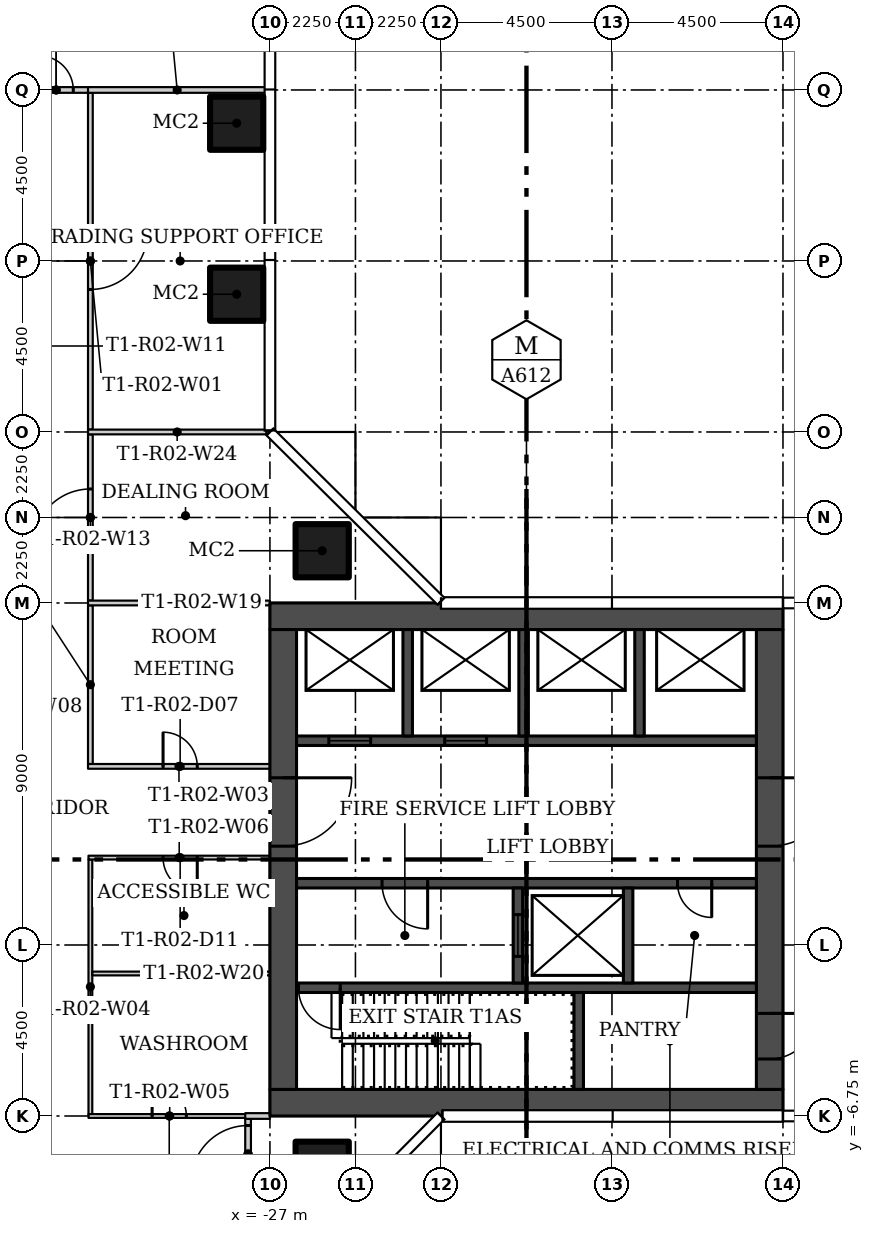
"""IFC4 building model, lengths in metres.
Left out: names, types, materials, properties, quantities, classifications, styles, units other than length and angle.
Written with IfcOpenShell. Run it as: python <this file> out.ifc"""

import sys

from ifc_helpers import new_model, si_unit, direction, frame, frame_2d, origin, origin_2d, place, context, subcontext, project, spatial, rectangle, hollow_rectangle, extrude, element, fill, save


model = new_model("IFC4")
c1 = context("Model", 3, precision=1e-05, world=origin(), true_north=direction((0.0, 1.0)))
c2 = subcontext(c1, "Body", "Model", "MODEL_VIEW")
j1 = project(units=[si_unit("LENGTHUNIT", "METRE"), si_unit("PLANEANGLEUNIT", "RADIAN")], contexts=[c1])
p1 = place(None, origin())
s1 = spatial("IfcSite", under=j1, at=p1, CompositionType="ELEMENT")
p2 = place(p1, origin())
s2 = spatial("IfcBuilding", under=s1, at=p2, CompositionType="ELEMENT")
p3 = place(p2, frame((0.0, 0.0, 33.0)))
s3 = spatial("IfcBuildingStorey", under=s2, at=p3, CompositionType="ELEMENT", Elevation=33.0)
for number, where in (
    (1, (-25.625, 8.125, 0.0)),
    (2, (-25.625, -8.125, 0.0)),
    (3, (-27.875, 14.875, 0.0)),
    (4, (-27.875, 19.375, 0.0)),
):
    element("IfcColumn", number, at=place(p3, frame(where)), inside=s3, PredefinedType="COLUMN", context=c2, shape_type="SweptSolid", body=[
        extrude(hollow_rectangle(XDim=1.4, YDim=1.4, WallThickness=0.05, at=origin_2d()), origin(), (0.0, 0.0, 1.0), 4.15),
    ])
p4 = place(p3, frame((-31.725, 20.175, 0.0), z_axis=(0.0, 0.0, 1.0), x_axis=(0.0, -1.0, 0.0)))
e5 = element("IfcWall", 5, at=p4, inside=s3, PredefinedType="PARTITIONING", context=c2, shape_type="SweptSolid", body=[
    extrude(rectangle(XDim=8.863, YDim=0.125, at=frame_2d((4.431, 0.0))), origin(), (0.0, 0.0, 1.0), 4.15),
])
p5 = place(p4, frame((3.675, 0.0, 0.0)))
e6 = element("IfcOpeningElement", 6, at=p5, cuts=e5, PredefinedType="OPENING", context=c2, shape_type="SweptSolid", body=[
    extrude(rectangle(XDim=1.5, YDim=2.1, at=frame_2d((0.75, 1.05))), frame((0.0, 0.073, 0.0), z_axis=(0.0, -1.0, 0.0), x_axis=(1.0, 0.0, 0.0)), (0.0, 0.0, 1.0), 0.145),
])
p6 = place(p3, frame((-31.725, 6.688, 0.0), z_axis=(0.0, 0.0, 1.0), x_axis=(0.0, -1.0, 0.0)))
e7 = element("IfcWall", 7, at=p6, inside=s3, PredefinedType="PARTITIONING", context=c2, shape_type="SweptSolid", body=[
    extrude(rectangle(XDim=4.175, YDim=0.125, at=frame_2d((2.087, 0.0))), origin(), (0.0, 0.0, 1.0), 4.15),
])
p7 = place(p3, frame((-31.787, 2.45, 0.0)))
e8 = element("IfcWall", 8, at=p7, inside=s3, PredefinedType="PARTITIONING", context=c2, shape_type="SweptSolid", body=[
    extrude(rectangle(XDim=4.787, YDim=0.125, at=frame_2d((2.394, 0.0))), origin(), (0.0, 0.0, 1.0), 4.15),
])
p8 = place(p7, frame((1.975, 0.0, 0.0)))
e9 = element("IfcOpeningElement", 9, at=p8, cuts=e8, PredefinedType="OPENING", context=c2, shape_type="SweptSolid", body=[
    extrude(rectangle(XDim=0.9, YDim=2.1, at=frame_2d((0.45, 1.05))), frame((0.0, 0.073, 0.0), z_axis=(0.0, -1.0, 0.0), x_axis=(1.0, 0.0, 0.0)), (0.0, 0.0, 1.0), 0.145),
])
p9 = place(p3, frame((-31.725, -0.0, 0.0), z_axis=(0.0, 0.0, 1.0), x_axis=(0.0, -1.0, 0.0)))
e10 = element("IfcWall", 10, at=p9, inside=s3, PredefinedType="PARTITIONING", context=c2, shape_type="SweptSolid", body=[
    extrude(rectangle(XDim=6.7, YDim=0.1, at=frame_2d((3.35, 0.0))), origin(), (0.0, 0.0, 1.0), 4.15),
])
p10 = place(p3, frame((-31.775, -6.75, 0.0)))
e11 = element("IfcWall", 11, at=p10, inside=s3, PredefinedType="PARTITIONING", context=c2, shape_type="SweptSolid", body=[
    extrude(rectangle(XDim=4.274, YDim=0.1, at=frame_2d((2.137, 0.0))), origin(), (0.0, 0.0, 1.0), 4.15),
])
p11 = place(p10, frame((1.675, 0.0, 0.0)))
e12 = element("IfcOpeningElement", 12, at=p11, cuts=e11, PredefinedType="OPENING", context=c2, shape_type="SweptSolid", body=[
    extrude(rectangle(XDim=0.9, YDim=2.1, at=frame_2d((0.45, 1.05))), frame((0.0, 0.06, 0.0), z_axis=(0.0, -1.0, 0.0), x_axis=(1.0, 0.0, 0.0)), (0.0, 0.0, 1.0), 0.12),
])
p12 = place(p3, frame((-27.0, 0.05, 0.0), z_axis=(0.0, 0.0, 1.0), x_axis=(-1.0, 0.0, 0.0)))
e13 = element("IfcWall", 13, at=p12, inside=s3, PredefinedType="PARTITIONING", context=c2, shape_type="SweptSolid", body=[
    extrude(rectangle(XDim=4.775, YDim=0.1, at=frame_2d((2.387, 0.0))), origin(), (0.0, 0.0, 1.0), 4.15),
])
p13 = place(p12, frame((1.912, 0.0, 0.0)))
e14 = element("IfcOpeningElement", 14, at=p13, cuts=e13, PredefinedType="OPENING", context=c2, shape_type="SweptSolid", body=[
    extrude(rectangle(XDim=0.9, YDim=2.1, at=frame_2d((0.45, 1.05))), frame((0.0, 0.06, 0.0), z_axis=(0.0, -1.0, 0.0), x_axis=(1.0, 0.0, 0.0)), (0.0, 0.0, 1.0), 0.12),
])
p14 = place(p3, frame((-31.725, 6.812, 0.0), z_axis=(0.0, 0.0, 1.0), x_axis=(0.0, 1.0, 0.0)))
e15 = element("IfcWall", 15, at=p14, inside=s3, PredefinedType="PARTITIONING", context=c2, shape_type="SweptSolid", body=[
    extrude(rectangle(XDim=4.375, YDim=0.125, at=frame_2d((2.188, 0.0))), origin(), (0.0, 0.0, 1.0), 4.15),
])
p15 = place(p14, frame((1.438, 0.0, 0.0)))
e16 = element("IfcOpeningElement", 16, at=p15, cuts=e15, PredefinedType="OPENING", context=c2, shape_type="SweptSolid", body=[
    extrude(rectangle(XDim=1.5, YDim=2.1, at=frame_2d((0.75, 1.05))), frame((0.0, 0.073, 0.0), z_axis=(0.0, -1.0, 0.0), x_axis=(1.0, 0.0, 0.0)), (0.0, 0.0, 1.0), 0.145),
])
p16 = place(p3, frame((-33.588, 20.25, 0.0)))
e17 = element("IfcWall", 17, at=p16, inside=s3, PredefinedType="PARTITIONING", context=c2, shape_type="SweptSolid", body=[
    extrude(rectangle(XDim=1.926, YDim=0.15, at=frame_2d((0.963, 0.0))), origin(), (0.0, 0.0, 1.0), 4.15),
])
p17 = place(p16, frame((0.513, 0.0, 0.0)))
e18 = element("IfcOpeningElement", 18, at=p17, cuts=e17, PredefinedType="OPENING", context=c2, shape_type="SweptSolid", body=[
    extrude(rectangle(XDim=0.9, YDim=2.1, at=frame_2d((0.45, 1.05))), frame((0.0, 0.085, 0.0), z_axis=(0.0, -1.0, 0.0), x_axis=(1.0, 0.0, 0.0)), (0.0, 0.0, 1.0), 0.17),
])
p18 = place(p3, frame((-27.575, -8.675, 0.0), z_axis=(0.0, 0.0, 1.0), x_axis=(0.0, 1.0, 0.0)))
e19 = element("IfcWall", 19, at=p18, inside=s3, PredefinedType="PARTITIONING", context=c2, shape_type="SweptSolid", body=[
    extrude(rectangle(XDim=1.85, YDim=0.15, at=frame_2d((0.925, 0.0))), origin(), (0.0, 0.0, 1.0), 4.15),
])
p19 = place(p18, frame((0.175, 0.0, 0.0)))
e20 = element("IfcOpeningElement", 20, at=p19, cuts=e19, PredefinedType="OPENING", context=c2, shape_type="SweptSolid", body=[
    extrude(rectangle(XDim=1.5, YDim=2.4, at=frame_2d((0.75, 1.2))), frame((0.0, 0.085, 0.0), z_axis=(0.0, -1.0, 0.0), x_axis=(1.0, 0.0, 0.0)), (0.0, 0.0, 1.0), 0.17),
])
p20 = place(p3, frame((-27.0, 6.75, 0.0), z_axis=(0.0, 0.0, 1.0), x_axis=(-1.0, 0.0, 0.0)))
e21 = element("IfcWall", 21, at=p20, inside=s3, PredefinedType="PARTITIONING", context=c2, shape_type="SweptSolid", body=[
    extrude(rectangle(XDim=4.787, YDim=0.125, at=frame_2d((2.394, 0.0))), origin(), (0.0, 0.0, 1.0), 4.15),
])
p21 = place(p3, frame((-27.0, -3.0, 0.0), z_axis=(0.0, 0.0, 1.0), x_axis=(-1.0, 0.0, 0.0)))
e22 = element("IfcWall", 22, at=p21, inside=s3, PredefinedType="PARTITIONING", context=c2, shape_type="SweptSolid", body=[
    extrude(rectangle(XDim=4.675, YDim=0.1, at=frame_2d((2.337, 0.0))), origin(), (0.0, 0.0, 1.0), 4.15),
])
p22 = place(p3, frame((-27.65, -6.75, 0.0)))
e23 = element("IfcWall", 23, at=p22, inside=s3, PredefinedType="PARTITIONING", context=c2, shape_type="SweptSolid", body=[
    extrude(rectangle(XDim=0.65, YDim=0.15, at=frame_2d((0.325, 0.0))), origin(), (0.0, 0.0, 1.0), 4.15),
])
p23 = place(p3, frame((-27.095, 11.25, 0.0), z_axis=(0.0, 0.0, 1.0), x_axis=(-1.0, 0.0, 0.0)))
e24 = element("IfcWall", 24, at=p23, inside=s3, PredefinedType="PARTITIONING", context=c2, shape_type="SweptSolid", body=[
    extrude(rectangle(XDim=4.692, YDim=0.125, at=frame_2d((2.346, 0.0))), origin(), (0.0, 0.0, 1.0), 4.15),
])
p24 = place(p3, frame((-27.095, 20.25, 0.0), z_axis=(0.0, 0.0, 1.0), x_axis=(-1.0, 0.0, 0.0)))
e25 = element("IfcWall", 25, at=p24, inside=s3, PredefinedType="PARTITIONING", context=c2, shape_type="SweptSolid", body=[
    extrude(rectangle(XDim=4.692, YDim=0.15, at=frame_2d((2.346, 0.0))), origin(), (0.0, 0.0, 1.0), 4.15),
])
for number, where in (
    (26, (-27.0, -6.4, 0.0)),
    (27, (-27.0, 6.4, 0.0)),
):
    element("IfcWall", number, at=place(p3, frame(where)), inside=s3, PredefinedType="SHEAR", context=c2, shape_type="SweptSolid", body=[
        extrude(rectangle(XDim=13.5, YDim=0.7, at=frame_2d((6.75, 0.0))), origin(), (0.0, 0.0, 1.0), 4.15),
    ])
p25 = place(p3, frame((-26.65, 6.05, 0.0), z_axis=(0.0, 0.0, 1.0), x_axis=(0.0, -1.0, 0.0)))
e28 = element("IfcWall", 28, at=p25, inside=s3, PredefinedType="SHEAR", context=c2, shape_type="SweptSolid", body=[
    extrude(rectangle(XDim=12.1, YDim=0.7, at=frame_2d((6.05, 0.0))), origin(), (0.0, 0.0, 1.0), 4.15),
])
p26 = place(p25, frame((3.9, 0.0, 0.0)))
e29 = element("IfcOpeningElement", 29, at=p26, cuts=e28, PredefinedType="OPENING", context=c2, shape_type="SweptSolid", body=[
    extrude(rectangle(XDim=1.8, YDim=2.4, at=frame_2d((0.9, 1.2))), frame((0.0, 0.36, 0.0), z_axis=(0.0, -1.0, 0.0), x_axis=(1.0, 0.0, 0.0)), (0.0, 0.0, 1.0), 0.72),
])
p27 = place(p3, frame((-13.85, 6.05, 0.0), z_axis=(0.0, 0.0, 1.0), x_axis=(0.0, -1.0, 0.0)))
e30 = element("IfcWall", 30, at=p27, inside=s3, PredefinedType="SHEAR", context=c2, shape_type="SweptSolid", body=[
    extrude(rectangle(XDim=12.1, YDim=0.7, at=frame_2d((6.05, 0.0))), origin(), (0.0, 0.0, 1.0), 4.15),
])
p28 = place(p27, frame((10.1, 0.0, 0.0)))
e31 = element("IfcOpeningElement", 31, at=p28, cuts=e30, PredefinedType="OPENING", context=c2, shape_type="SweptSolid", body=[
    extrude(rectangle(XDim=1.2, YDim=2.1, at=frame_2d((0.6, 1.05))), frame((0.0, 0.36, 0.0), z_axis=(0.0, -1.0, 0.0), x_axis=(1.0, 0.0, 0.0)), (0.0, 0.0, 1.0), 0.72),
])
p29 = place(p27, frame((3.9, 0.0, 0.0)))
e32 = element("IfcOpeningElement", 32, at=p29, cuts=e30, PredefinedType="OPENING", context=c2, shape_type="SweptSolid", body=[
    extrude(rectangle(XDim=1.8, YDim=2.4, at=frame_2d((0.9, 1.2))), frame((0.0, 0.36, 0.0), z_axis=(0.0, -1.0, 0.0), x_axis=(1.0, 0.0, 0.0)), (0.0, 0.0, 1.0), 0.72),
])
p30 = place(p3, frame((-14.2, -3.375, 0.0), z_axis=(0.0, 0.0, 1.0), x_axis=(-1.0, 0.0, 0.0)))
e33 = element("IfcWall", 33, at=p30, inside=s3, PredefinedType="SHEAR", context=c2, shape_type="SweptSolid", body=[
    extrude(rectangle(XDim=12.1, YDim=0.25, at=frame_2d((6.05, 0.0))), origin(), (0.0, 0.0, 1.0), 4.15),
])
p31 = place(p30, frame((10.95, 0.0, 0.0)))
e34 = element("IfcOpeningElement", 34, at=p31, cuts=e33, PredefinedType="OPENING", context=c2, shape_type="SweptSolid", body=[
    extrude(rectangle(XDim=1.1, YDim=2.1, at=frame_2d((0.55, 1.05))), frame((0.0, 0.135, 0.0), z_axis=(0.0, -1.0, 0.0), x_axis=(1.0, 0.0, 0.0)), (0.0, 0.0, 1.0), 0.27),
])
p32 = place(p3, frame((-18.875, -6.05, 0.0), z_axis=(0.0, 0.0, 1.0), x_axis=(0.0, 1.0, 0.0)))
e35 = element("IfcWall", 35, at=p32, inside=s3, PredefinedType="SHEAR", context=c2, shape_type="SweptSolid", body=[
    extrude(rectangle(XDim=2.55, YDim=0.25, at=frame_2d((1.275, 0.0))), origin(), (0.0, 0.0, 1.0), 4.15),
])
p33 = place(p3, frame((-14.2, -0.625, 0.0), z_axis=(0.0, 0.0, 1.0), x_axis=(-1.0, 0.0, 0.0)))
e36 = element("IfcWall", 36, at=p33, inside=s3, PredefinedType="SHEAR", context=c2, shape_type="SweptSolid", body=[
    extrude(rectangle(XDim=12.1, YDim=0.25, at=frame_2d((6.05, 0.0))), origin(), (0.0, 0.0, 1.0), 4.15),
])
p34 = place(p33, frame((8.65, 0.0, 0.0)))
e37 = element("IfcOpeningElement", 37, at=p34, cuts=e36, PredefinedType="OPENING", context=c2, shape_type="SweptSolid", body=[
    extrude(rectangle(XDim=1.2, YDim=2.1, at=frame_2d((0.6, 1.05))), frame((0.0, 0.135, 0.0), z_axis=(0.0, -1.0, 0.0), x_axis=(1.0, 0.0, 0.0)), (0.0, 0.0, 1.0), 0.27),
])
p35 = place(p33, frame((1.175, 0.0, 0.0)))
e38 = element("IfcOpeningElement", 38, at=p35, cuts=e36, PredefinedType="OPENING", context=c2, shape_type="SweptSolid", body=[
    extrude(rectangle(XDim=0.9, YDim=2.1, at=frame_2d((0.45, 1.05))), frame((0.0, 0.135, 0.0), z_axis=(0.0, -1.0, 0.0), x_axis=(1.0, 0.0, 0.0)), (0.0, 0.0, 1.0), 0.27),
])
p36 = place(p3, frame((-20.475, -3.25, 0.0), z_axis=(0.0, 0.0, 1.0), x_axis=(0.0, 1.0, 0.0)))
e39 = element("IfcWall", 39, at=p36, inside=s3, PredefinedType="SHEAR", context=c2, shape_type="SweptSolid", body=[
    extrude(rectangle(XDim=2.5, YDim=0.25, at=frame_2d((1.25, 0.0))), origin(), (0.0, 0.0, 1.0), 4.15),
])
p37 = place(p36, frame((0.7, 0.0, 0.0)))
e40 = element("IfcOpeningElement", 40, at=p37, cuts=e39, PredefinedType="OPENING", context=c2, shape_type="SweptSolid", body=[
    extrude(rectangle(XDim=1.1, YDim=2.1, at=frame_2d((0.55, 1.05))), frame((0.0, 0.135, 0.0), z_axis=(0.0, -1.0, 0.0), x_axis=(1.0, 0.0, 0.0)), (0.0, 0.0, 1.0), 0.27),
])
p38 = place(p3, frame((-17.575, -3.25, 0.0), z_axis=(0.0, 0.0, 1.0), x_axis=(0.0, 1.0, 0.0)))
e41 = element("IfcWall", 41, at=p38, inside=s3, PredefinedType="SHEAR", context=c2, shape_type="SweptSolid", body=[
    extrude(rectangle(XDim=2.5, YDim=0.25, at=frame_2d((1.25, 0.0))), origin(), (0.0, 0.0, 1.0), 4.15),
])
p39 = place(p3, frame((-26.3, 3.125, 0.0)))
e42 = element("IfcWall", 42, at=p39, inside=s3, PredefinedType="SHEAR", context=c2, shape_type="SweptSolid", body=[
    extrude(rectangle(XDim=12.1, YDim=0.25, at=frame_2d((6.05, 0.0))), origin(), (0.0, 0.0, 1.0), 4.15),
])
p40 = place(p39, frame((0.85, 0.0, 0.0)))
e43 = element("IfcOpeningElement", 43, at=p40, cuts=e42, PredefinedType="OPENING", context=c2, shape_type="SweptSolid", body=[
    extrude(rectangle(XDim=1.1, YDim=2.1, at=frame_2d((0.55, 1.05))), frame((0.0, 0.135, 0.0), z_axis=(0.0, -1.0, 0.0), x_axis=(1.0, 0.0, 0.0)), (0.0, 0.0, 1.0), 0.27),
])
p41 = place(p39, frame((3.9, 0.0, 0.0)))
e44 = element("IfcOpeningElement", 44, at=p41, cuts=e42, PredefinedType="OPENING", context=c2, shape_type="SweptSolid", body=[
    extrude(rectangle(XDim=1.1, YDim=2.1, at=frame_2d((0.55, 1.05))), frame((0.0, 0.135, 0.0), z_axis=(0.0, -1.0, 0.0), x_axis=(1.0, 0.0, 0.0)), (0.0, 0.0, 1.0), 0.27),
])
for number, where, z_axis, x_axis in (
    (45, (-23.375, 3.25, 0.0), (0.0, 0.0, 1.0), (0.0, 1.0, 0.0)),
    (46, (-20.325, 3.25, 0.0), (0.0, 0.0, 1.0), (0.0, 1.0, 0.0)),
    (47, (-17.275, 3.25, 0.0), (0.0, 0.0, 1.0), (0.0, 1.0, 0.0)),
):
    element("IfcWall", number, at=place(p3, frame(where, z_axis=z_axis, x_axis=x_axis)), inside=s3, PredefinedType="SHEAR", context=c2, shape_type="SweptSolid", body=[
        extrude(rectangle(XDim=2.8, YDim=0.25, at=frame_2d((1.4, 0.0))), origin(), (0.0, 0.0, 1.0), 4.15),
    ])
p42 = place(p17, origin())
e48 = element("IfcDoor", 48, at=p42, inside=s3, OperationType="SINGLE_SWING_LEFT", PredefinedType="DOOR", context=c2, shape_type="SweptSolid", body=[
    extrude(rectangle(XDim=0.9, YDim=2.1, at=frame_2d((0.45, 1.05))), frame((0.0, 0.025, 0.0), z_axis=(0.0, -1.0, 0.0), x_axis=(1.0, 0.0, 0.0)), (0.0, 0.0, 1.0), 0.05),
])
fill(e18, e48)
p43 = place(p11, origin())
e49 = element("IfcDoor", 49, at=p43, inside=s3, OperationType="SINGLE_SWING_RIGHT", PredefinedType="DOOR", context=c2, shape_type="SweptSolid", body=[
    extrude(rectangle(XDim=0.9, YDim=2.1, at=frame_2d((0.45, 1.05))), frame((0.0, 0.025, 0.0), z_axis=(0.0, -1.0, 0.0), x_axis=(1.0, 0.0, 0.0)), (0.0, 0.0, 1.0), 0.05),
])
fill(e12, e49)
p44 = place(p8, origin())
e50 = element("IfcDoor", 50, at=p44, inside=s3, OperationType="SINGLE_SWING_LEFT", PredefinedType="DOOR", context=c2, shape_type="SweptSolid", body=[
    extrude(rectangle(XDim=0.9, YDim=2.1, at=frame_2d((0.45, 1.05))), frame((0.0, 0.025, 0.0), z_axis=(0.0, -1.0, 0.0), x_axis=(1.0, 0.0, 0.0)), (0.0, 0.0, 1.0), 0.05),
])
fill(e9, e50)
p45 = place(p15, origin())
e51 = element("IfcDoor", 51, at=p45, inside=s3, OperationType="DOUBLE_DOOR_SINGLE_SWING", PredefinedType="DOOR", context=c2, shape_type="SweptSolid", body=[
    extrude(rectangle(XDim=1.5, YDim=2.1, at=frame_2d((0.75, 1.05))), frame((0.0, 0.025, 0.0), z_axis=(0.0, -1.0, 0.0), x_axis=(1.0, 0.0, 0.0)), (0.0, 0.0, 1.0), 0.05),
])
fill(e16, e51)
p46 = place(p5, origin())
e52 = element("IfcDoor", 52, at=p46, inside=s3, OperationType="DOUBLE_DOOR_SINGLE_SWING", PredefinedType="DOOR", context=c2, shape_type="SweptSolid", body=[
    extrude(rectangle(XDim=1.5, YDim=2.1, at=frame_2d((0.75, 1.05))), frame((0.0, 0.025, 0.0), z_axis=(0.0, -1.0, 0.0), x_axis=(1.0, 0.0, 0.0)), (0.0, 0.0, 1.0), 0.05),
])
fill(e6, e52)
p47 = place(p19, origin())
e53 = element("IfcDoor", 53, at=p47, inside=s3, OperationType="DOUBLE_DOOR_SINGLE_SWING", PredefinedType="DOOR", context=c2, shape_type="SweptSolid", body=[
    extrude(rectangle(XDim=1.5, YDim=2.4, at=frame_2d((0.75, 1.2))), frame((0.0, 0.025, 0.0), z_axis=(0.0, -1.0, 0.0), x_axis=(1.0, 0.0, 0.0)), (0.0, 0.0, 1.0), 0.05),
])
fill(e20, e53)
p48 = place(p13, origin())
e54 = element("IfcDoor", 54, at=p48, inside=s3, OperationType="SINGLE_SWING_LEFT", PredefinedType="DOOR", context=c2, shape_type="SweptSolid", body=[
    extrude(rectangle(XDim=0.9, YDim=2.1, at=frame_2d((0.45, 1.05))), frame((0.0, 0.025, 0.0), z_axis=(0.0, -1.0, 0.0), x_axis=(1.0, 0.0, 0.0)), (0.0, 0.0, 1.0), 0.05),
])
fill(e14, e54)
p49 = place(p26, origin())
e55 = element("IfcDoor", 55, at=p49, inside=s3, OperationType="DOUBLE_DOOR_SINGLE_SWING", PredefinedType="DOOR", context=c2, shape_type="SweptSolid", body=[
    extrude(rectangle(XDim=1.8, YDim=2.4, at=frame_2d((0.9, 1.2))), frame((0.0, 0.025, 0.0), z_axis=(0.0, -1.0, 0.0), x_axis=(1.0, 0.0, 0.0)), (0.0, 0.0, 1.0), 0.05),
])
fill(e29, e55)
p50 = place(p28, origin())
e56 = element("IfcDoor", 56, at=p50, inside=s3, OperationType="SINGLE_SWING_RIGHT", PredefinedType="DOOR", context=c2, shape_type="SweptSolid", body=[
    extrude(rectangle(XDim=1.2, YDim=2.1, at=frame_2d((0.6, 1.05))), frame((0.0, 0.025, 0.0), z_axis=(0.0, -1.0, 0.0), x_axis=(1.0, 0.0, 0.0)), (0.0, 0.0, 1.0), 0.05),
])
fill(e31, e56)
p51 = place(p29, origin())
e57 = element("IfcDoor", 57, at=p51, inside=s3, OperationType="DOUBLE_DOOR_SINGLE_SWING", PredefinedType="DOOR", context=c2, shape_type="SweptSolid", body=[
    extrude(rectangle(XDim=1.8, YDim=2.4, at=frame_2d((0.9, 1.2))), frame((0.0, 0.025, 0.0), z_axis=(0.0, -1.0, 0.0), x_axis=(1.0, 0.0, 0.0)), (0.0, 0.0, 1.0), 0.05),
])
fill(e32, e57)
p52 = place(p31, origin())
e58 = element("IfcDoor", 58, at=p52, inside=s3, OperationType="SINGLE_SWING_RIGHT", PredefinedType="DOOR", context=c2, shape_type="SweptSolid", body=[
    extrude(rectangle(XDim=1.1, YDim=2.1, at=frame_2d((0.55, 1.05))), frame((0.0, 0.025, 0.0), z_axis=(0.0, -1.0, 0.0), x_axis=(1.0, 0.0, 0.0)), (0.0, 0.0, 1.0), 0.05),
])
fill(e34, e58)
p53 = place(p34, origin())
e59 = element("IfcDoor", 59, at=p53, inside=s3, OperationType="SINGLE_SWING_RIGHT", PredefinedType="DOOR", context=c2, shape_type="SweptSolid", body=[
    extrude(rectangle(XDim=1.2, YDim=2.1, at=frame_2d((0.6, 1.05))), frame((0.0, 0.025, 0.0), z_axis=(0.0, -1.0, 0.0), x_axis=(1.0, 0.0, 0.0)), (0.0, 0.0, 1.0), 0.05),
])
fill(e37, e59)
p54 = place(p35, origin())
e60 = element("IfcDoor", 60, at=p54, inside=s3, OperationType="SINGLE_SWING_LEFT", PredefinedType="DOOR", context=c2, shape_type="SweptSolid", body=[
    extrude(rectangle(XDim=0.9, YDim=2.1, at=frame_2d((0.45, 1.05))), frame((0.0, 0.025, 0.0), z_axis=(0.0, -1.0, 0.0), x_axis=(1.0, 0.0, 0.0)), (0.0, 0.0, 1.0), 0.05),
])
fill(e38, e60)
p55 = place(p37, origin())
e61 = element("IfcDoor", 61, at=p55, inside=s3, OperationType="SLIDING_TO_LEFT", PredefinedType="DOOR", context=c2, shape_type="SweptSolid", body=[
    extrude(rectangle(XDim=1.1, YDim=2.1, at=frame_2d((0.55, 1.05))), frame((0.0, 0.025, 0.0), z_axis=(0.0, -1.0, 0.0), x_axis=(1.0, 0.0, 0.0)), (0.0, 0.0, 1.0), 0.05),
])
fill(e40, e61)
p56 = place(p40, origin())
e62 = element("IfcDoor", 62, at=p56, inside=s3, OperationType="SLIDING_TO_LEFT", PredefinedType="DOOR", context=c2, shape_type="SweptSolid", body=[
    extrude(rectangle(XDim=1.1, YDim=2.1, at=frame_2d((0.55, 1.05))), frame((0.0, 0.025, 0.0), z_axis=(0.0, -1.0, 0.0), x_axis=(1.0, 0.0, 0.0)), (0.0, 0.0, 1.0), 0.05),
])
fill(e43, e62)
p57 = place(p41, origin())
e63 = element("IfcDoor", 63, at=p57, inside=s3, OperationType="SLIDING_TO_LEFT", PredefinedType="DOOR", context=c2, shape_type="SweptSolid", body=[
    extrude(rectangle(XDim=1.1, YDim=2.1, at=frame_2d((0.55, 1.05))), frame((0.0, 0.025, 0.0), z_axis=(0.0, -1.0, 0.0), x_axis=(1.0, 0.0, 0.0)), (0.0, 0.0, 1.0), 0.05),
])
fill(e44, e63)
save(model, sys.argv[1])
